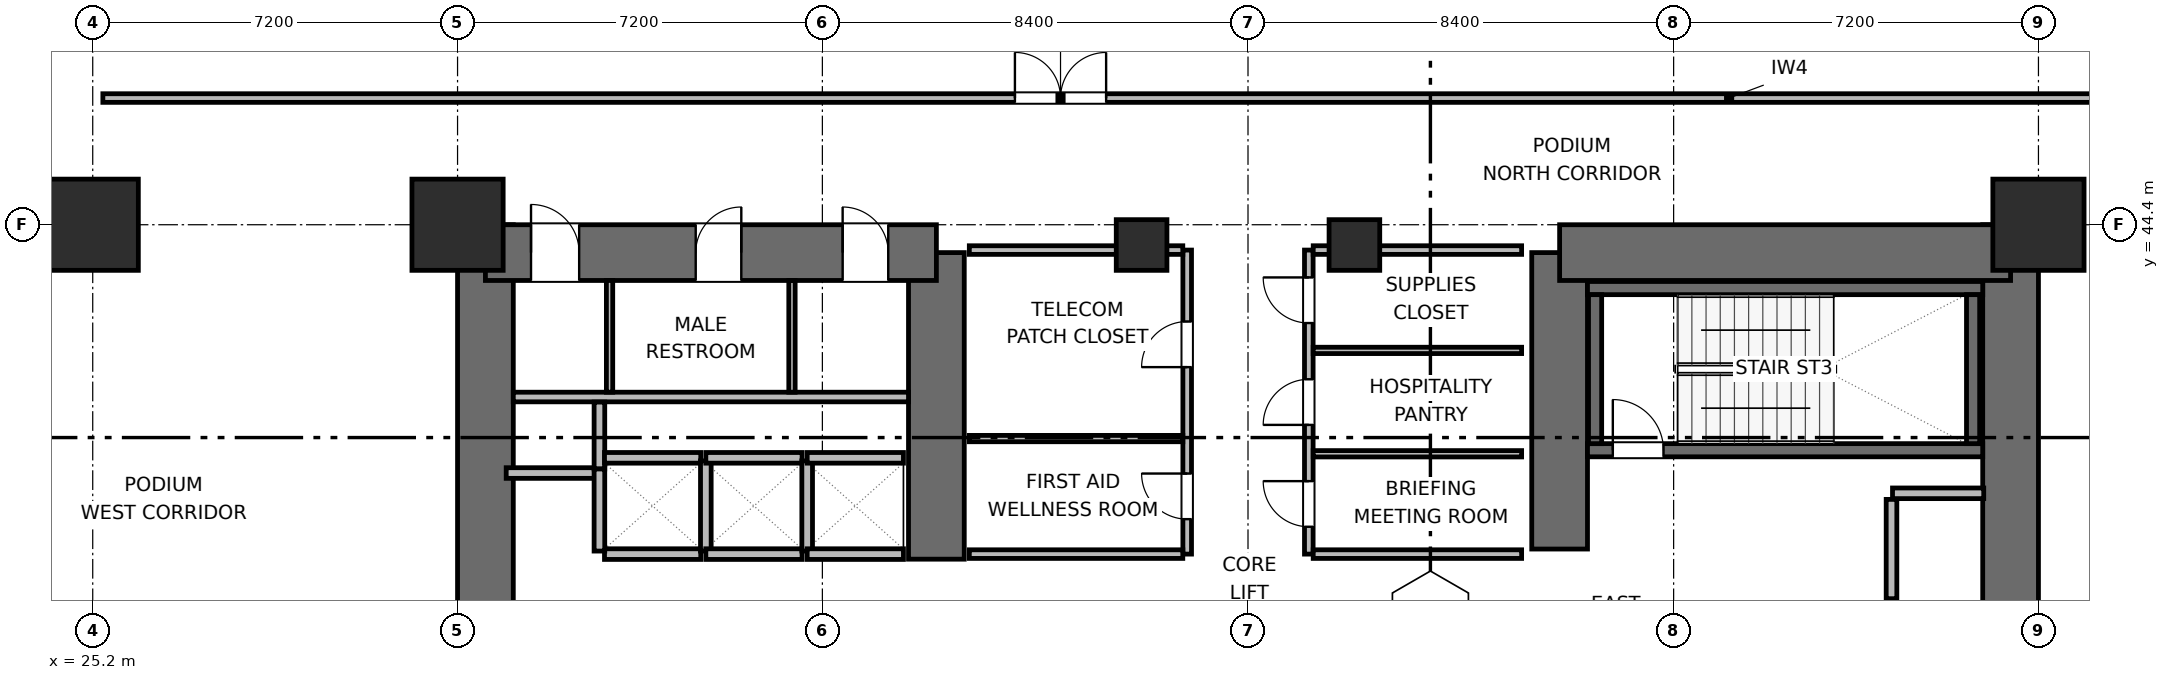
"""IFC4 building model, lengths in metres.
Left out: names, types, materials, properties, quantities, classifications, styles, units other than length and angle.
Written with IfcOpenShell. Run it as: python <this file> out.ifc"""

import sys

from ifc_helpers import new_model, si_unit, direction, frame, frame_2d, origin, origin_2d, place, context, subcontext, project, spatial, rectangle, extrude, element, fill, save


model = new_model("IFC4")
c1 = context("Model", 3, precision=1e-05, world=origin(), true_north=direction((0.0, 1.0)))
c2 = subcontext(c1, "Body", "Model", "MODEL_VIEW")
j1 = project(units=[si_unit("LENGTHUNIT", "METRE"), si_unit("PLANEANGLEUNIT", "RADIAN")], contexts=[c1])
p1 = place(None, origin())
s1 = spatial("IfcSite", under=j1, at=p1, CompositionType="ELEMENT")
p2 = place(p1, origin())
s2 = spatial("IfcBuilding", under=s1, at=p2, CompositionType="ELEMENT")
p3 = place(p2, frame((0.0, 0.0, 4.5)))
s3 = spatial("IfcBuildingStorey", under=s2, at=p3, CompositionType="ELEMENT", Elevation=4.5)
p4 = place(p3, frame((32.95, 27.6, 0.0), z_axis=(0.0, 0.0, 1.0), x_axis=(0.0, 1.0, 0.0)))
e1 = element("IfcWall", 1, at=p4, inside=s3, PredefinedType="SHEAR", context=c2, shape_type="SweptSolid", body=[
    extrude(rectangle(XDim=16.8, YDim=1.1, at=frame_2d((8.4, 0.0))), origin(), (0.0, 0.0, 1.0), 4.2),
])
p5 = place(p3, frame((41.85, 37.8, 0.0), z_axis=(0.0, 0.0, 1.0), x_axis=(0.0, 1.0, 0.0)))
e2 = element("IfcWall", 2, at=p5, inside=s3, PredefinedType="SHEAR", context=c2, shape_type="SweptSolid", body=[
    extrude(rectangle(XDim=6.05, YDim=1.1, at=frame_2d((3.025, 0.0))), origin(), (0.0, 0.0, 1.0), 4.2),
])
p6 = place(p3, frame((32.95, 43.85, 0.0), z_axis=(0.0, 0.0, 1.0), x_axis=(1.0, 0.0, 0.0)))
e3 = element("IfcWall", 3, at=p6, inside=s3, PredefinedType="SHEAR", context=c2, shape_type="SweptSolid", body=[
    extrude(rectangle(XDim=8.9, YDim=1.1, at=frame_2d((4.45, 0.0))), origin(), (0.0, 0.0, 1.0), 4.2),
])
p7 = place(p6, frame((0.9, 0.0, 0.0)))
e4 = element("IfcOpeningElement", 4, at=p7, cuts=e3, PredefinedType="OPENING", context=c2, shape_type="SweptSolid", body=[
    extrude(rectangle(XDim=0.95, YDim=2.04, at=frame_2d((0.475, 1.02))), frame((0.0, 0.56, 0.0), z_axis=(0.0, -1.0, 0.0), x_axis=(1.0, 0.0, 0.0)), (0.0, 0.0, 1.0), 1.12),
])
p8 = place(p6, frame((4.15, 0.0, 0.0)))
e5 = element("IfcOpeningElement", 5, at=p8, cuts=e3, PredefinedType="OPENING", context=c2, shape_type="SweptSolid", body=[
    extrude(rectangle(XDim=0.9, YDim=2.02, at=frame_2d((0.45, 1.01))), frame((0.0, 0.56, 0.0), z_axis=(0.0, -1.0, 0.0), x_axis=(1.0, 0.0, 0.0)), (0.0, 0.0, 1.0), 1.12),
])
p9 = place(p6, frame((7.05, 0.0, 0.0)))
e6 = element("IfcOpeningElement", 6, at=p9, cuts=e3, PredefinedType="OPENING", context=c2, shape_type="SweptSolid", body=[
    extrude(rectangle(XDim=0.9, YDim=2.02, at=frame_2d((0.45, 1.01))), frame((0.0, 0.56, 0.0), z_axis=(0.0, -1.0, 0.0), x_axis=(1.0, 0.0, 0.0)), (0.0, 0.0, 1.0), 1.12),
])
p10 = place(p3, frame((54.15, 38.0, 0.0), z_axis=(0.0, 0.0, 1.0), x_axis=(0.0, 1.0, 0.0)))
e7 = element("IfcWall", 7, at=p10, inside=s3, PredefinedType="SHEAR", context=c2, shape_type="SweptSolid", body=[
    extrude(rectangle(XDim=5.85, YDim=1.1, at=frame_2d((2.925, 0.0))), origin(), (0.0, 0.0, 1.0), 4.2),
])
p11 = place(p3, frame((63.05, 27.6, 0.0), z_axis=(0.0, 0.0, 1.0), x_axis=(0.0, 1.0, 0.0)))
e8 = element("IfcWall", 8, at=p11, inside=s3, PredefinedType="SHEAR", context=c2, shape_type="SweptSolid", body=[
    extrude(rectangle(XDim=16.8, YDim=1.1, at=frame_2d((8.4, 0.0))), origin(), (0.0, 0.0, 1.0), 4.2),
])
p12 = place(p3, frame((54.15, 43.85, 0.0), z_axis=(0.0, 0.0, 1.0), x_axis=(1.0, 0.0, 0.0)))
e9 = element("IfcWall", 9, at=p12, inside=s3, PredefinedType="SHEAR", context=c2, shape_type="SweptSolid", body=[
    extrude(rectangle(XDim=8.9, YDim=1.1, at=frame_2d((4.45, 0.0))), origin(), (0.0, 0.0, 1.0), 4.2),
])
p13 = place(p3, frame((54.7, 39.95, 0.0), z_axis=(0.0, 0.0, 1.0), x_axis=(1.0, 0.0, 0.0)))
e10 = element("IfcWall", 10, at=p13, inside=s3, PredefinedType="SHEAR", context=c2, shape_type="SweptSolid", body=[
    extrude(rectangle(XDim=7.8, YDim=0.26, at=frame_2d((3.9, 0.0))), origin(), (0.0, 0.0, 1.0), 4.2),
])
p14 = place(p13, frame((0.5, 0.0, 0.0)))
e11 = element("IfcOpeningElement", 11, at=p14, cuts=e10, PredefinedType="OPENING", context=c2, shape_type="SweptSolid", body=[
    extrude(rectangle(XDim=1.0, YDim=2.04, at=frame_2d((0.5, 1.02))), frame((0.0, 0.14, 0.0), z_axis=(0.0, -1.0, 0.0), x_axis=(1.0, 0.0, 0.0)), (0.0, 0.0, 1.0), 0.28),
])
p15 = place(p3, frame((54.7, 43.15, 0.0), z_axis=(0.0, 0.0, 1.0), x_axis=(1.0, 0.0, 0.0)))
e12 = element("IfcWall", 12, at=p15, inside=s3, PredefinedType="SHEAR", context=c2, shape_type="SweptSolid", body=[
    extrude(rectangle(XDim=7.8, YDim=0.26, at=frame_2d((3.9, 0.0))), origin(), (0.0, 0.0, 1.0), 4.2),
])
for number, where, z_axis, x_axis in (
    (13, (54.85, 40.08, 0.0), (0.0, 0.0, 1.0), (0.0, 1.0, 0.0)),
    (14, (62.31, 40.08, 0.0), (0.0, 0.0, 1.0), (0.0, 1.0, 0.0)),
):
    element("IfcWall", number, at=place(p3, frame(where, z_axis=z_axis, x_axis=x_axis)), inside=s3, PredefinedType="SHEAR", context=c2, shape_type="SweptSolid", body=[
        extrude(rectangle(XDim=2.94, YDim=0.26, at=frame_2d((1.47, 0.0))), origin(), (0.0, 0.0, 1.0), 4.2),
    ])
for number, where, z_axis, x_axis in (
    (15, (25.2, 44.4, 0.0), (0.0, 0.0, 1.0), (1.0, 0.0, 0.0)),
    (16, (32.4, 44.4, 0.0), (0.0, 0.0, 1.0), (1.0, 0.0, 0.0)),
    (17, (63.6, 44.4, 0.0), (0.0, 0.0, 1.0), (1.0, 0.0, 0.0)),
):
    element("IfcColumn", number, at=place(p3, frame(where, z_axis=z_axis, x_axis=x_axis)), inside=s3, PredefinedType="COLUMN", context=c2, shape_type="SweptSolid", body=[
        extrude(rectangle(XDim=1.8, YDim=1.8, at=origin_2d()), origin(), (0.0, 0.0, 1.0), 4.2),
    ])
for number, where, z_axis, x_axis in (
    (18, (45.9, 44.0, 0.0), (0.0, 0.0, 1.0), (1.0, 0.0, 0.0)),
    (19, (50.1, 44.0, 0.0), (0.0, 0.0, 1.0), (1.0, 0.0, 0.0)),
):
    element("IfcColumn", number, at=place(p3, frame(where, z_axis=z_axis, x_axis=x_axis)), inside=s3, PredefinedType="COLUMN", context=c2, shape_type="SweptSolid", body=[
        extrude(rectangle(XDim=1.0, YDim=1.0, at=origin_2d()), origin(), (0.0, 0.0, 1.0), 4.2),
    ])
p16 = place(p3, frame((33.5, 41.0, 0.0), z_axis=(0.0, 0.0, 1.0), x_axis=(1.0, 0.0, 0.0)))
e20 = element("IfcWall", 20, at=p16, inside=s3, PredefinedType="PLUMBINGWALL", context=c2, shape_type="SweptSolid", body=[
    extrude(rectangle(XDim=7.8, YDim=0.19, at=frame_2d((3.9, 0.0))), origin(), (0.0, 0.0, 1.0), 3.88),
])
for number, where, z_axis, x_axis in (
    (21, (35.4, 41.095, 0.0), (0.0, 0.0, 1.0), (0.0, 1.0, 0.0)),
    (22, (39.0, 41.095, 0.0), (0.0, 0.0, 1.0), (0.0, 1.0, 0.0)),
):
    element("IfcWall", number, at=place(p3, frame(where, z_axis=z_axis, x_axis=x_axis)), inside=s3, PredefinedType="PARTITIONING", context=c2, shape_type="SweptSolid", body=[
        extrude(rectangle(XDim=2.205, YDim=0.125, at=frame_2d((1.103, 0.0))), origin(), (0.0, 0.0, 1.0), 3.88),
    ])
p17 = place(p3, frame((33.36, 39.5, 0.0), z_axis=(0.0, 0.0, 1.0), x_axis=(1.0, 0.0, 0.0)))
e23 = element("IfcWall", 23, at=p17, inside=s3, PredefinedType="PARTITIONING", context=c2, shape_type="SweptSolid", body=[
    extrude(rectangle(XDim=1.86, YDim=0.21, at=frame_2d((0.93, 0.0))), origin(), (0.0, 0.0, 1.0), 3.88),
])
p18 = place(p3, frame((35.2, 39.58, 0.0), z_axis=(0.0, 0.0, 1.0), x_axis=(0.0, 1.0, 0.0)))
e24 = element("IfcWall", 24, at=p18, inside=s3, PredefinedType="PARTITIONING", context=c2, shape_type="SweptSolid", body=[
    extrude(rectangle(XDim=1.32, YDim=0.21, at=frame_2d((0.66, 0.0))), origin(), (0.0, 0.0, 1.0), 3.88),
])
p19 = place(p3, frame((60.72, 39.1, 0.0), z_axis=(0.0, 0.0, 1.0), x_axis=(1.0, 0.0, 0.0)))
e25 = element("IfcWall", 25, at=p19, inside=s3, PredefinedType="PARTITIONING", context=c2, shape_type="SweptSolid", body=[
    extrude(rectangle(XDim=1.8, YDim=0.21, at=frame_2d((0.9, 0.0))), origin(), (0.0, 0.0, 1.0), 3.88),
])
p20 = place(p3, frame((60.7, 37.02, 0.0), z_axis=(0.0, 0.0, 1.0), x_axis=(0.0, 1.0, 0.0)))
e26 = element("IfcWall", 26, at=p20, inside=s3, PredefinedType="PARTITIONING", context=c2, shape_type="SweptSolid", body=[
    extrude(rectangle(XDim=1.96, YDim=0.21, at=frame_2d((0.98, 0.0))), origin(), (0.0, 0.0, 1.0), 3.88),
])
for number, where, z_axis, x_axis in (
    (27, (35.3, 37.9, 0.0), (0.0, 0.0, 1.0), (1.0, 0.0, 0.0)),
    (28, (35.3, 39.8, 0.0), (0.0, 0.0, 1.0), (1.0, 0.0, 0.0)),
):
    element("IfcWall", number, at=place(p3, frame(where, z_axis=z_axis, x_axis=x_axis)), inside=s3, PredefinedType="PARTITIONING", context=c2, shape_type="SweptSolid", body=[
        extrude(rectangle(XDim=1.9, YDim=0.21, at=frame_2d((0.95, 0.0))), origin(), (0.0, 0.0, 1.0), 3.88),
    ])
p21 = place(p3, frame((35.2, 37.96, 0.0), z_axis=(0.0, 0.0, 1.0), x_axis=(0.0, 1.0, 0.0)))
e29 = element("IfcWall", 29, at=p21, inside=s3, PredefinedType="PARTITIONING", context=c2, shape_type="SweptSolid", body=[
    extrude(rectangle(XDim=1.62, YDim=0.21, at=frame_2d((0.81, 0.0))), origin(), (0.0, 0.0, 1.0), 3.88),
])
p22 = place(p3, frame((37.3, 37.96, 0.0), z_axis=(0.0, 0.0, 1.0), x_axis=(0.0, 1.0, 0.0)))
e30 = element("IfcWall", 30, at=p22, inside=s3, PredefinedType="PARTITIONING", context=c2, shape_type="SweptSolid", body=[
    extrude(rectangle(XDim=1.78, YDim=0.21, at=frame_2d((0.89, 0.0))), origin(), (0.0, 0.0, 1.0), 3.88),
])
for number, where, z_axis, x_axis in (
    (31, (37.3, 37.9, 0.0), (0.0, 0.0, 1.0), (1.0, 0.0, 0.0)),
    (32, (37.3, 39.8, 0.0), (0.0, 0.0, 1.0), (1.0, 0.0, 0.0)),
):
    element("IfcWall", number, at=place(p3, frame(where, z_axis=z_axis, x_axis=x_axis)), inside=s3, PredefinedType="PARTITIONING", context=c2, shape_type="SweptSolid", body=[
        extrude(rectangle(XDim=1.9, YDim=0.21, at=frame_2d((0.95, 0.0))), origin(), (0.0, 0.0, 1.0), 3.88),
    ])
p23 = place(p3, frame((39.3, 37.96, 0.0), z_axis=(0.0, 0.0, 1.0), x_axis=(0.0, 1.0, 0.0)))
e33 = element("IfcWall", 33, at=p23, inside=s3, PredefinedType="PARTITIONING", context=c2, shape_type="SweptSolid", body=[
    extrude(rectangle(XDim=1.78, YDim=0.21, at=frame_2d((0.89, 0.0))), origin(), (0.0, 0.0, 1.0), 3.88),
])
for number, where, z_axis, x_axis in (
    (34, (39.3, 37.9, 0.0), (0.0, 0.0, 1.0), (1.0, 0.0, 0.0)),
    (35, (39.3, 39.8, 0.0), (0.0, 0.0, 1.0), (1.0, 0.0, 0.0)),
):
    element("IfcWall", number, at=place(p3, frame(where, z_axis=z_axis, x_axis=x_axis)), inside=s3, PredefinedType="PARTITIONING", context=c2, shape_type="SweptSolid", body=[
        extrude(rectangle(XDim=1.9, YDim=0.21, at=frame_2d((0.95, 0.0))), origin(), (0.0, 0.0, 1.0), 3.88),
    ])
p24 = place(p3, frame((46.8, 37.9, 0.0), z_axis=(0.0, 0.0, 1.0), x_axis=(0.0, 1.0, 0.0)))
e36 = element("IfcWall", 36, at=p24, inside=s3, PredefinedType="PARTITIONING", context=c2, shape_type="SweptSolid", body=[
    extrude(rectangle(XDim=6.0, YDim=0.17, at=frame_2d((3.0, 0.0))), origin(), (0.0, 0.0, 1.0), 3.88),
])
p25 = place(p24, frame((0.69, 0.0, 0.0)))
e37 = element("IfcOpeningElement", 37, at=p25, cuts=e36, PredefinedType="OPENING", context=c2, shape_type="SweptSolid", body=[
    extrude(rectangle(XDim=0.9, YDim=2.02, at=frame_2d((0.45, 1.01))), frame((0.0, 0.095, 0.0), z_axis=(0.0, -1.0, 0.0), x_axis=(1.0, 0.0, 0.0)), (0.0, 0.0, 1.0), 0.19),
])
p26 = place(p24, frame((3.69, 0.0, 0.0)))
e38 = element("IfcOpeningElement", 38, at=p26, cuts=e36, PredefinedType="OPENING", context=c2, shape_type="SweptSolid", body=[
    extrude(rectangle(XDim=0.9, YDim=2.02, at=frame_2d((0.45, 1.01))), frame((0.0, 0.095, 0.0), z_axis=(0.0, -1.0, 0.0), x_axis=(1.0, 0.0, 0.0)), (0.0, 0.0, 1.0), 0.19),
])
p27 = place(p3, frame((42.5, 37.9, 0.0), z_axis=(0.0, 0.0, 1.0), x_axis=(1.0, 0.0, 0.0)))
e39 = element("IfcWall", 39, at=p27, inside=s3, PredefinedType="PARTITIONING", context=c2, shape_type="SweptSolid", body=[
    extrude(rectangle(XDim=4.213, YDim=0.17, at=frame_2d((2.106, 0.0))), origin(), (0.0, 0.0, 1.0), 3.88),
])
p28 = place(p3, frame((42.5, 43.9, 0.0), z_axis=(0.0, 0.0, 1.0), x_axis=(1.0, 0.0, 0.0)))
e40 = element("IfcWall", 40, at=p28, inside=s3, PredefinedType="PARTITIONING", context=c2, shape_type="SweptSolid", body=[
    extrude(rectangle(XDim=4.213, YDim=0.17, at=frame_2d((2.106, 0.0))), origin(), (0.0, 0.0, 1.0), 2.765),
])
p29 = place(p3, frame((42.5, 40.18, 0.0), z_axis=(0.0, 0.0, 1.0), x_axis=(1.0, 0.0, 0.0)))
e41 = element("IfcWall", 41, at=p29, inside=s3, PredefinedType="PARTITIONING", context=c2, shape_type="SweptSolid", body=[
    extrude(rectangle(XDim=4.213, YDim=0.125, at=frame_2d((2.106, 0.0))), origin(), (0.0, 0.0, 1.0), 3.88),
])
p30 = place(p3, frame((49.2, 37.9, 0.0), z_axis=(0.0, 0.0, 1.0), x_axis=(0.0, 1.0, 0.0)))
e42 = element("IfcWall", 42, at=p30, inside=s3, PredefinedType="PARTITIONING", context=c2, shape_type="SweptSolid", body=[
    extrude(rectangle(XDim=6.0, YDim=0.17, at=frame_2d((3.0, 0.0))), origin(), (0.0, 0.0, 1.0), 3.88),
])
p31 = place(p30, frame((0.54, 0.0, 0.0)))
e43 = element("IfcOpeningElement", 43, at=p31, cuts=e42, PredefinedType="OPENING", context=c2, shape_type="SweptSolid", body=[
    extrude(rectangle(XDim=0.9, YDim=2.02, at=frame_2d((0.45, 1.01))), frame((0.0, 0.095, 0.0), z_axis=(0.0, -1.0, 0.0), x_axis=(1.0, 0.0, 0.0)), (0.0, 0.0, 1.0), 0.19),
])
p32 = place(p30, frame((2.55, 0.0, 0.0)))
e44 = element("IfcOpeningElement", 44, at=p32, cuts=e42, PredefinedType="OPENING", context=c2, shape_type="SweptSolid", body=[
    extrude(rectangle(XDim=0.9, YDim=2.02, at=frame_2d((0.45, 1.01))), frame((0.0, 0.095, 0.0), z_axis=(0.0, -1.0, 0.0), x_axis=(1.0, 0.0, 0.0)), (0.0, 0.0, 1.0), 0.19),
])
p33 = place(p30, frame((4.56, 0.0, 0.0)))
e45 = element("IfcOpeningElement", 45, at=p33, cuts=e42, PredefinedType="OPENING", context=c2, shape_type="SweptSolid", body=[
    extrude(rectangle(XDim=0.9, YDim=2.02, at=frame_2d((0.45, 1.01))), frame((0.0, 0.095, 0.0), z_axis=(0.0, -1.0, 0.0), x_axis=(1.0, 0.0, 0.0)), (0.0, 0.0, 1.0), 0.19),
])
p34 = place(p3, frame((49.287, 37.9, 0.0), z_axis=(0.0, 0.0, 1.0), x_axis=(1.0, 0.0, 0.0)))
e46 = element("IfcWall", 46, at=p34, inside=s3, PredefinedType="PARTITIONING", context=c2, shape_type="SweptSolid", body=[
    extrude(rectangle(XDim=4.113, YDim=0.17, at=frame_2d((2.056, 0.0))), origin(), (0.0, 0.0, 1.0), 3.88),
])
p35 = place(p3, frame((49.287, 43.9, 0.0), z_axis=(0.0, 0.0, 1.0), x_axis=(1.0, 0.0, 0.0)))
e47 = element("IfcWall", 47, at=p35, inside=s3, PredefinedType="PARTITIONING", context=c2, shape_type="SweptSolid", body=[
    extrude(rectangle(XDim=4.113, YDim=0.17, at=frame_2d((2.056, 0.0))), origin(), (0.0, 0.0, 1.0), 2.765),
])
for number, where, z_axis, x_axis in (
    (48, (49.287, 39.88, 0.0), (0.0, 0.0, 1.0), (1.0, 0.0, 0.0)),
    (49, (49.287, 41.92, 0.0), (0.0, 0.0, 1.0), (1.0, 0.0, 0.0)),
):
    element("IfcWall", number, at=place(p3, frame(where, z_axis=z_axis, x_axis=x_axis)), inside=s3, PredefinedType="PARTITIONING", context=c2, shape_type="SweptSolid", body=[
        extrude(rectangle(XDim=4.113, YDim=0.125, at=frame_2d((2.056, 0.0))), origin(), (0.0, 0.0, 1.0), 3.88),
    ])
p36 = place(p3, frame((25.4, 46.9, 0.0), z_axis=(0.0, 0.0, 1.0), x_axis=(1.0, 0.0, 0.0)))
e50 = element("IfcWall", 50, at=p36, inside=s3, PredefinedType="PARTITIONING", context=c2, shape_type="SweptSolid", body=[
    extrude(rectangle(XDim=43.4, YDim=0.17, at=frame_2d((21.7, 0.0))), origin(), (0.0, 0.0, 1.0), 3.88),
])
p37 = place(p36, frame((18.0, 0.0, 0.0)))
e51 = element("IfcOpeningElement", 51, at=p37, cuts=e50, PredefinedType="OPENING", context=c2, shape_type="SweptSolid", body=[
    extrude(rectangle(XDim=1.8, YDim=2.06, at=frame_2d((0.9, 1.03))), frame((0.0, 0.095, 0.0), z_axis=(0.0, -1.0, 0.0), x_axis=(1.0, 0.0, 0.0)), (0.0, 0.0, 1.0), 0.19),
])
p38 = place(p14, origin())
e52 = element("IfcDoor", 52, at=p38, inside=s3, OperationType="SINGLE_SWING_LEFT", PredefinedType="DOOR", context=c2, shape_type="SweptSolid", body=[
    extrude(rectangle(XDim=1.0, YDim=2.04, at=frame_2d((0.5, 1.02))), frame((0.0, 0.025, 0.0), z_axis=(0.0, -1.0, 0.0), x_axis=(1.0, 0.0, 0.0)), (0.0, 0.0, 1.0), 0.05),
])
fill(e11, e52)
p39 = place(p7, origin())
e53 = element("IfcDoor", 53, at=p39, inside=s3, OperationType="SINGLE_SWING_LEFT", PredefinedType="DOOR", context=c2, shape_type="SweptSolid", body=[
    extrude(rectangle(XDim=0.95, YDim=2.04, at=frame_2d((0.475, 1.02))), frame((0.0, 0.025, 0.0), z_axis=(0.0, -1.0, 0.0), x_axis=(1.0, 0.0, 0.0)), (0.0, 0.0, 1.0), 0.05),
])
fill(e4, e53)
p40 = place(p8, origin())
e54 = element("IfcDoor", 54, at=p40, inside=s3, OperationType="SINGLE_SWING_RIGHT", PredefinedType="DOOR", context=c2, shape_type="SweptSolid", body=[
    extrude(rectangle(XDim=0.9, YDim=2.02, at=frame_2d((0.45, 1.01))), frame((0.0, 0.025, 0.0), z_axis=(0.0, -1.0, 0.0), x_axis=(1.0, 0.0, 0.0)), (0.0, 0.0, 1.0), 0.05),
])
fill(e5, e54)
p41 = place(p9, origin())
e55 = element("IfcDoor", 55, at=p41, inside=s3, OperationType="SINGLE_SWING_LEFT", PredefinedType="DOOR", context=c2, shape_type="SweptSolid", body=[
    extrude(rectangle(XDim=0.9, YDim=2.02, at=frame_2d((0.45, 1.01))), frame((0.0, 0.025, 0.0), z_axis=(0.0, -1.0, 0.0), x_axis=(1.0, 0.0, 0.0)), (0.0, 0.0, 1.0), 0.05),
])
fill(e6, e55)
p42 = place(p25, origin())
e56 = element("IfcDoor", 56, at=p42, inside=s3, OperationType="SINGLE_SWING_RIGHT", PredefinedType="DOOR", context=c2, shape_type="SweptSolid", body=[
    extrude(rectangle(XDim=0.9, YDim=2.02, at=frame_2d((0.45, 1.01))), frame((0.0, 0.025, 0.0), z_axis=(0.0, -1.0, 0.0), x_axis=(1.0, 0.0, 0.0)), (0.0, 0.0, 1.0), 0.05),
])
fill(e37, e56)
p43 = place(p26, origin())
e57 = element("IfcDoor", 57, at=p43, inside=s3, OperationType="SINGLE_SWING_LEFT", PredefinedType="DOOR", context=c2, shape_type="SweptSolid", body=[
    extrude(rectangle(XDim=0.9, YDim=2.02, at=frame_2d((0.45, 1.01))), frame((0.0, 0.025, 0.0), z_axis=(0.0, -1.0, 0.0), x_axis=(1.0, 0.0, 0.0)), (0.0, 0.0, 1.0), 0.05),
])
fill(e38, e57)
p44 = place(p31, origin())
e58 = element("IfcDoor", 58, at=p44, inside=s3, OperationType="SINGLE_SWING_RIGHT", PredefinedType="DOOR", context=c2, shape_type="SweptSolid", body=[
    extrude(rectangle(XDim=0.9, YDim=2.02, at=frame_2d((0.45, 1.01))), frame((0.0, 0.025, 0.0), z_axis=(0.0, -1.0, 0.0), x_axis=(1.0, 0.0, 0.0)), (0.0, 0.0, 1.0), 0.05),
])
fill(e43, e58)
p45 = place(p32, origin())
e59 = element("IfcDoor", 59, at=p45, inside=s3, OperationType="SINGLE_SWING_LEFT", PredefinedType="DOOR", context=c2, shape_type="SweptSolid", body=[
    extrude(rectangle(XDim=0.9, YDim=2.02, at=frame_2d((0.45, 1.01))), frame((0.0, 0.025, 0.0), z_axis=(0.0, -1.0, 0.0), x_axis=(1.0, 0.0, 0.0)), (0.0, 0.0, 1.0), 0.05),
])
fill(e44, e59)
p46 = place(p33, origin())
e60 = element("IfcDoor", 60, at=p46, inside=s3, OperationType="SINGLE_SWING_RIGHT", PredefinedType="DOOR", context=c2, shape_type="SweptSolid", body=[
    extrude(rectangle(XDim=0.9, YDim=2.02, at=frame_2d((0.45, 1.01))), frame((0.0, 0.025, 0.0), z_axis=(0.0, -1.0, 0.0), x_axis=(1.0, 0.0, 0.0)), (0.0, 0.0, 1.0), 0.05),
])
fill(e45, e60)
p47 = place(p37, origin())
e61 = element("IfcDoor", 61, at=p47, inside=s3, OperationType="DOUBLE_DOOR_SINGLE_SWING", PredefinedType="DOOR", context=c2, shape_type="SweptSolid", body=[
    extrude(rectangle(XDim=1.8, YDim=2.06, at=frame_2d((0.9, 1.03))), frame((0.0, 0.025, 0.0), z_axis=(0.0, -1.0, 0.0), x_axis=(1.0, 0.0, 0.0)), (0.0, 0.0, 1.0), 0.05),
])
fill(e51, e61)
save(model, sys.argv[1])
